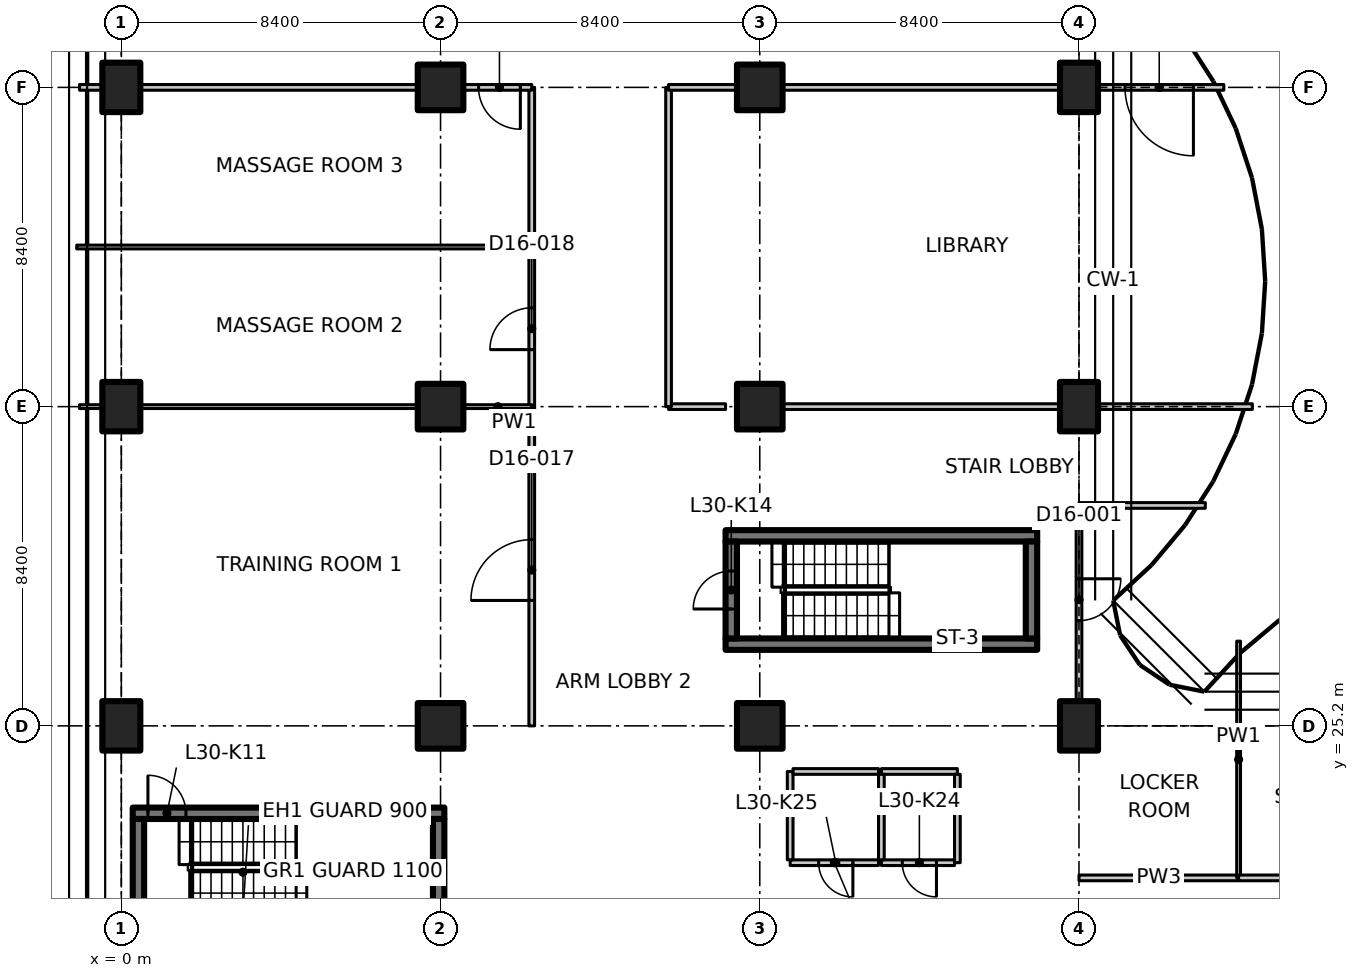
"""IFC4 building model, lengths in metres.
Left out: names, types, materials, properties, quantities, classifications, styles, units other than length and angle.
Written with IfcOpenShell. Run it as: python <this file> out.ifc"""

import sys

from ifc_helpers import new_model, si_unit, direction, frame, frame_2d, origin, origin_2d, place, context, subcontext, project, spatial, polyline, rectangle, outline, extrude, element, fill, save


model = new_model("IFC4")
c1 = context("Model", 3, precision=1e-05, world=origin(), true_north=direction((0.0, 1.0)))
c2 = subcontext(c1, "Body", "Model", "MODEL_VIEW")
j1 = project(units=[si_unit("LENGTHUNIT", "METRE"), si_unit("PLANEANGLEUNIT", "RADIAN")], contexts=[c1])
p1 = place(None, origin())
s1 = spatial("IfcSite", under=j1, at=p1, CompositionType="ELEMENT")
p2 = place(p1, origin())
s2 = spatial("IfcBuilding", under=s1, at=p2, CompositionType="ELEMENT")
p3 = place(p2, frame((0.0, 0.0, 124.1)))
s3 = spatial("IfcBuildingStorey", under=s2, at=p3, CompositionType="ELEMENT", Elevation=124.1)
for number, where, z_axis, x_axis in (
    (1, (0.0, 25.2, 0.0), (0.0, 0.0, 1.0), (1.0, 0.0, 0.0)),
    (2, (0.0, 33.6, 0.0), (0.0, 0.0, 1.0), (1.0, 0.0, 0.0)),
    (3, (0.0, 42.0, 0.0), (0.0, 0.0, 1.0), (1.0, 0.0, 0.0)),
):
    element("IfcColumn", number, at=place(p3, frame(where, z_axis=z_axis, x_axis=x_axis)), inside=s3, PredefinedType="COLUMN", context=c2, shape_type="SweptSolid", body=[
        extrude(rectangle(XDim=1.0, YDim=1.3, at=origin_2d()), origin(), (0.0, 0.0, 1.0), 3.35),
    ])
for number, where, z_axis, x_axis in (
    (4, (8.4, 25.2, 0.0), (0.0, 0.0, 1.0), (1.0, 0.0, 0.0)),
    (5, (8.4, 33.6, 0.0), (0.0, 0.0, 1.0), (1.0, 0.0, 0.0)),
    (6, (8.4, 42.0, 0.0), (0.0, 0.0, 1.0), (1.0, 0.0, 0.0)),
    (7, (16.8, 25.2, 0.0), (0.0, 0.0, 1.0), (1.0, 0.0, 0.0)),
    (8, (16.8, 33.6, 0.0), (0.0, 0.0, 1.0), (1.0, 0.0, 0.0)),
    (9, (16.8, 42.0, 0.0), (0.0, 0.0, 1.0), (1.0, 0.0, 0.0)),
):
    element("IfcColumn", number, at=place(p3, frame(where, z_axis=z_axis, x_axis=x_axis)), inside=s3, PredefinedType="COLUMN", context=c2, shape_type="SweptSolid", body=[
        extrude(rectangle(XDim=1.2, YDim=1.2, at=origin_2d()), origin(), (0.0, 0.0, 1.0), 3.35),
    ])
for number, where, z_axis, x_axis in (
    (10, (25.2, 25.2, 0.0), (0.0, 0.0, 1.0), (1.0, 0.0, 0.0)),
    (11, (25.2, 33.6, 0.0), (0.0, 0.0, 1.0), (1.0, 0.0, 0.0)),
    (12, (25.2, 42.0, 0.0), (0.0, 0.0, 1.0), (1.0, 0.0, 0.0)),
):
    element("IfcColumn", number, at=place(p3, frame(where, z_axis=z_axis, x_axis=x_axis)), inside=s3, PredefinedType="COLUMN", context=c2, shape_type="SweptSolid", body=[
        extrude(rectangle(XDim=1.0, YDim=1.3, at=origin_2d()), origin(), (0.0, 0.0, 1.0), 3.35),
    ])
p4 = place(p3, frame((0.3, 22.9, 0.0), z_axis=(0.0, 0.0, 1.0), x_axis=(1.0, 0.0, 0.0)))
e13 = element("IfcWall", 13, at=p4, inside=s3, PredefinedType="SHEAR", context=c2, shape_type="SweptSolid", body=[
    extrude(rectangle(XDim=8.2, YDim=0.3, at=frame_2d((4.1, 0.0))), origin(), (0.0, 0.0, 1.0), 3.35),
])
p5 = place(p4, frame((0.4, 0.0, 0.0)))
e14 = element("IfcOpeningElement", 14, at=p5, cuts=e13, PredefinedType="OPENING", context=c2, shape_type="SweptSolid", body=[
    extrude(rectangle(XDim=1.0, YDim=2.1, at=frame_2d((0.5, 1.05))), frame((0.0, 0.16, 0.0), z_axis=(0.0, -1.0, 0.0), x_axis=(1.0, 0.0, 0.0)), (0.0, 0.0, 1.0), 0.32),
])
for number, where, z_axis, x_axis in (
    (15, (0.45, 20.2, 0.0), (0.0, 0.0, 1.0), (0.0, 1.0, 0.0)),
    (16, (8.35, 20.2, 0.0), (0.0, 0.0, 1.0), (0.0, 1.0, 0.0)),
):
    element("IfcWall", number, at=place(p3, frame(where, z_axis=z_axis, x_axis=x_axis)), inside=s3, PredefinedType="SHEAR", context=c2, shape_type="SweptSolid", body=[
        extrude(rectangle(XDim=2.55, YDim=0.3, at=frame_2d((1.275, 0.0))), origin(), (0.0, 0.0, 1.0), 3.35),
    ])
for number, where, z_axis, x_axis in (
    (17, (15.9, 27.35, 0.0), (0.0, 0.0, 1.0), (1.0, 0.0, 0.0)),
    (18, (15.9, 30.2, 0.0), (0.0, 0.0, 1.0), (1.0, 0.0, 0.0)),
):
    element("IfcWall", number, at=place(p3, frame(where, z_axis=z_axis, x_axis=x_axis)), inside=s3, PredefinedType="SHEAR", context=c2, shape_type="SweptSolid", body=[
        extrude(rectangle(XDim=8.2, YDim=0.3, at=frame_2d((4.1, 0.0))), origin(), (0.0, 0.0, 1.0), 3.35),
    ])
p6 = place(p3, frame((16.05, 27.5, 0.0), z_axis=(0.0, 0.0, 1.0), x_axis=(0.0, 1.0, 0.0)))
e19 = element("IfcWall", 19, at=p6, inside=s3, PredefinedType="SHEAR", context=c2, shape_type="SweptSolid", body=[
    extrude(rectangle(XDim=2.55, YDim=0.3, at=frame_2d((1.275, 0.0))), origin(), (0.0, 0.0, 1.0), 3.35),
])
p7 = place(p6, frame((0.775, 0.0, 0.0)))
e20 = element("IfcOpeningElement", 20, at=p7, cuts=e19, PredefinedType="OPENING", context=c2, shape_type="SweptSolid", body=[
    extrude(rectangle(XDim=1.0, YDim=2.1, at=frame_2d((0.5, 1.05))), frame((0.0, 0.16, 0.0), z_axis=(0.0, -1.0, 0.0), x_axis=(1.0, 0.0, 0.0)), (0.0, 0.0, 1.0), 0.32),
])
p8 = place(p3, frame((23.95, 27.5, 0.0), z_axis=(0.0, 0.0, 1.0), x_axis=(0.0, 1.0, 0.0)))
e21 = element("IfcWall", 21, at=p8, inside=s3, PredefinedType="SHEAR", context=c2, shape_type="SweptSolid", body=[
    extrude(rectangle(XDim=2.55, YDim=0.3, at=frame_2d((1.275, 0.0))), origin(), (0.0, 0.0, 1.0), 3.35),
])
p9 = place(p3, frame((20.0, 24.0, 0.0), z_axis=(0.0, 0.0, 1.0), x_axis=(1.0, 0.0, 0.0)))
e22 = element("IfcWall", 22, at=p9, inside=s3, PredefinedType="PARTITIONING", context=c2, shape_type="SweptSolid", body=[
    extrude(rectangle(XDim=2.0, YDim=0.15, at=frame_2d((1.0, 0.0))), origin(), (0.0, 0.0, 1.0), 3.35),
])
p10 = place(p3, frame((22.0, 23.925, 0.0), z_axis=(0.0, 0.0, 1.0), x_axis=(0.0, -1.0, 0.0)))
e23 = element("IfcWall", 23, at=p10, inside=s3, PredefinedType="PARTITIONING", context=c2, shape_type="SweptSolid", body=[
    extrude(rectangle(XDim=2.325, YDim=0.15, at=frame_2d((1.163, 0.0))), origin(), (0.0, 0.0, 1.0), 3.35),
])
p11 = place(p3, frame((21.925, 21.6, 0.0), z_axis=(0.0, 0.0, 1.0), x_axis=(-1.0, 0.0, 0.0)))
e24 = element("IfcWall", 24, at=p11, inside=s3, PredefinedType="PARTITIONING", context=c2, shape_type="SweptSolid", body=[
    extrude(rectangle(XDim=1.925, YDim=0.15, at=frame_2d((0.962, 0.0))), origin(), (0.0, 0.0, 1.0), 3.35),
])
p12 = place(p11, frame((0.475, 0.0, 0.0)))
e25 = element("IfcOpeningElement", 25, at=p12, cuts=e24, PredefinedType="OPENING", context=c2, shape_type="SweptSolid", body=[
    extrude(rectangle(XDim=0.9, YDim=2.1, at=frame_2d((0.45, 1.05))), frame((0.0, 0.085, 0.0), z_axis=(0.0, -1.0, 0.0), x_axis=(1.0, 0.0, 0.0)), (0.0, 0.0, 1.0), 0.17),
])
p13 = place(p3, frame((20.0, 21.675, 0.0), z_axis=(0.0, 0.0, 1.0), x_axis=(0.0, 1.0, 0.0)))
e26 = element("IfcWall", 26, at=p13, inside=s3, PredefinedType="PARTITIONING", context=c2, shape_type="SweptSolid", body=[
    extrude(rectangle(XDim=2.25, YDim=0.15, at=frame_2d((1.125, 0.0))), origin(), (0.0, 0.0, 1.0), 3.35),
])
p14 = place(p3, frame((19.925, 21.6, 0.0), z_axis=(0.0, 0.0, 1.0), x_axis=(-1.0, 0.0, 0.0)))
e27 = element("IfcWall", 27, at=p14, inside=s3, PredefinedType="PARTITIONING", context=c2, shape_type="SweptSolid", body=[
    extrude(rectangle(XDim=2.325, YDim=0.15, at=frame_2d((1.163, 0.0))), origin(), (0.0, 0.0, 1.0), 3.35),
])
p15 = place(p14, frame((0.675, 0.0, 0.0)))
e28 = element("IfcOpeningElement", 28, at=p15, cuts=e27, PredefinedType="OPENING", context=c2, shape_type="SweptSolid", body=[
    extrude(rectangle(XDim=0.9, YDim=2.1, at=frame_2d((0.45, 1.05))), frame((0.0, 0.085, 0.0), z_axis=(0.0, -1.0, 0.0), x_axis=(1.0, 0.0, 0.0)), (0.0, 0.0, 1.0), 0.17),
])
p16 = place(p3, frame((17.6, 21.675, 0.0), z_axis=(0.0, 0.0, 1.0), x_axis=(0.0, 1.0, 0.0)))
e29 = element("IfcWall", 29, at=p16, inside=s3, PredefinedType="PARTITIONING", context=c2, shape_type="SweptSolid", body=[
    extrude(rectangle(XDim=2.325, YDim=0.15, at=frame_2d((1.163, 0.0))), origin(), (0.0, 0.0, 1.0), 3.35),
])
p17 = place(p3, frame((17.675, 24.0, 0.0), z_axis=(0.0, 0.0, 1.0), x_axis=(1.0, 0.0, 0.0)))
e30 = element("IfcWall", 30, at=p17, inside=s3, PredefinedType="PARTITIONING", context=c2, shape_type="SweptSolid", body=[
    extrude(rectangle(XDim=2.25, YDim=0.15, at=frame_2d((1.125, 0.0))), origin(), (0.0, 0.0, 1.0), 3.35),
])
p18 = place(p3, frame((25.2, 21.2, 0.0), z_axis=(0.0, 0.0, 1.0), x_axis=(1.0, 0.0, 0.0)))
e31 = element("IfcWall", 31, at=p18, inside=s3, PredefinedType="PARTITIONING", context=c2, shape_type="SweptSolid", body=[
    extrude(rectangle(XDim=4.2, YDim=0.15, at=frame_2d((2.1, 0.0))), origin(), (0.0, 0.0, 1.0), 3.33),
])
p19 = place(p3, frame((29.4, 27.429, 0.0), z_axis=(0.0, 0.0, 1.0), x_axis=(0.0, -1.0, 0.0)))
e32 = element("IfcWall", 32, at=p19, inside=s3, PredefinedType="PARTITIONING", context=c2, shape_type="SweptSolid", body=[
    extrude(outline(polyline([(0.0, 0.0), (6.229, 0.0), (6.229, 3.33), (2.679, 3.33), (2.677, 2.98), (1.781, 2.98), (1.779, 3.33), (0.154, 3.33), (0.0, 3.33), (0.0, 0.0)])), frame((0.0, 0.05, 0.0), z_axis=(0.0, -1.0, 0.0), x_axis=(1.0, 0.0, 0.0)), (0.0, 0.0, 1.0), 0.1),
])
p20 = place(p3, frame((25.2, 31.0, 0.0), z_axis=(0.0, 0.0, 1.0), x_axis=(0.0, -1.0, 0.0)))
e33 = element("IfcWall", 33, at=p20, inside=s3, PredefinedType="PARTITIONING", context=c2, shape_type="SweptSolid", body=[
    extrude(outline(polyline([(0.0, 0.0), (5.13, 0.0), (5.13, 2.98), (0.0, 2.98), (0.0, 0.0)])), frame((0.0, 0.075, 0.0), z_axis=(0.0, -1.0, 0.0), x_axis=(1.0, 0.0, 0.0)), (0.0, 0.0, 1.0), 0.15),
])
p21 = place(p20, frame((1.93, 0.0, 0.0)))
e34 = element("IfcOpeningElement", 34, at=p21, cuts=e33, PredefinedType="OPENING", context=c2, shape_type="SweptSolid", body=[
    extrude(rectangle(XDim=1.1, YDim=2.1, at=frame_2d((0.55, 1.05))), frame((0.0, 0.085, 0.0), z_axis=(0.0, -1.0, 0.0), x_axis=(1.0, 0.0, 0.0)), (0.0, 0.0, 1.0), 0.17),
])
p22 = place(p3, frame((25.2, 31.0, 0.0), z_axis=(0.0, 0.0, 1.0), x_axis=(1.0, 0.0, 0.0)))
e35 = element("IfcWall", 35, at=p22, inside=s3, PredefinedType="PARTITIONING", context=c2, shape_type="SweptSolid", body=[
    extrude(rectangle(XDim=3.324, YDim=0.15, at=frame_2d((1.662, 0.0))), origin(), (0.0, 0.0, 1.0), 2.98),
])
p23 = place(p3, frame((29.4, 21.2, 0.0), z_axis=(0.0, 0.0, 1.0), x_axis=(1.0, 0.0, 0.0)))
e36 = element("IfcWall", 36, at=p23, inside=s3, PredefinedType="PARTITIONING", context=c2, shape_type="SweptSolid", body=[
    extrude(rectangle(XDim=4.2, YDim=0.15, at=frame_2d((2.1, 0.0))), origin(), (0.0, 0.0, 1.0), 3.33),
])
p24 = place(p23, frame((1.5, 0.0, 0.0)))
e37 = element("IfcOpeningElement", 37, at=p24, cuts=e36, PredefinedType="OPENING", context=c2, shape_type="SweptSolid", body=[
    extrude(rectangle(XDim=1.1, YDim=2.1, at=frame_2d((0.55, 1.05))), frame((0.0, 0.085, 0.0), z_axis=(0.0, -1.0, 0.0), x_axis=(1.0, 0.0, 0.0)), (0.0, 0.0, 1.0), 0.17),
])
p25 = place(p3, frame((10.8, 25.2, 0.0), z_axis=(0.0, 0.0, 1.0), x_axis=(0.0, 1.0, 0.0)))
e38 = element("IfcWall", 38, at=p25, inside=s3, PredefinedType="PARTITIONING", context=c2, shape_type="SweptSolid", body=[
    extrude(rectangle(XDim=8.4, YDim=0.15, at=frame_2d((4.2, 0.0))), origin(), (0.0, 0.0, 1.0), 3.33),
])
p26 = place(p25, frame((3.3, 0.0, 0.0)))
e39 = element("IfcOpeningElement", 39, at=p26, cuts=e38, PredefinedType="OPENING", context=c2, shape_type="SweptSolid", body=[
    extrude(rectangle(XDim=1.6, YDim=2.1, at=frame_2d((0.8, 1.05))), frame((0.0, 0.085, 0.0), z_axis=(0.0, -1.0, 0.0), x_axis=(1.0, 0.0, 0.0)), (0.0, 0.0, 1.0), 0.17),
])
p27 = place(p3, frame((14.4, 33.6, 0.0), z_axis=(0.0, 0.0, 1.0), x_axis=(1.0, 0.0, 0.0)))
e40 = element("IfcWall", 40, at=p27, inside=s3, PredefinedType="PARTITIONING", context=c2, shape_type="SweptSolid", body=[
    extrude(rectangle(XDim=1.5, YDim=0.15, at=frame_2d((0.75, 0.0))), origin(), (0.0, 0.0, 1.0), 3.33),
])
p28 = place(p3, frame((17.42, 33.6, 0.0), z_axis=(0.0, 0.0, 1.0), x_axis=(1.0, 0.0, 0.0)))
e41 = element("IfcWall", 41, at=p28, inside=s3, PredefinedType="PARTITIONING", context=c2, shape_type="SweptSolid", body=[
    extrude(rectangle(XDim=7.26, YDim=0.15, at=frame_2d((3.63, 0.0))), origin(), (0.0, 0.0, 1.0), 3.33),
])
p29 = place(p3, frame((25.72, 33.6, 0.0), z_axis=(0.0, 0.0, 1.0), x_axis=(1.0, 0.0, 0.0)))
e42 = element("IfcWall", 42, at=p29, inside=s3, PredefinedType="PARTITIONING", context=c2, shape_type="SweptSolid", body=[
    extrude(rectangle(XDim=4.042, YDim=0.15, at=frame_2d((2.021, 0.0))), origin(), (0.0, 0.0, 1.0), 2.98),
])
p30 = place(p3, frame((10.8, 33.6, 0.0), z_axis=(0.0, 0.0, 1.0), x_axis=(0.0, 1.0, 0.0)))
e43 = element("IfcWall", 43, at=p30, inside=s3, PredefinedType="PARTITIONING", context=c2, shape_type="SweptSolid", body=[
    extrude(rectangle(XDim=4.2, YDim=0.15, at=frame_2d((2.1, 0.0))), origin(), (0.0, 0.0, 1.0), 3.33),
])
p31 = place(p30, frame((1.5, 0.0, 0.0)))
e44 = element("IfcOpeningElement", 44, at=p31, cuts=e43, PredefinedType="OPENING", context=c2, shape_type="SweptSolid", body=[
    extrude(rectangle(XDim=1.1, YDim=2.1, at=frame_2d((0.55, 1.05))), frame((0.0, 0.085, 0.0), z_axis=(0.0, -1.0, 0.0), x_axis=(1.0, 0.0, 0.0)), (0.0, 0.0, 1.0), 0.17),
])
p32 = place(p3, frame((10.8, 37.8, 0.0), z_axis=(0.0, 0.0, 1.0), x_axis=(0.0, 1.0, 0.0)))
e45 = element("IfcWall", 45, at=p32, inside=s3, PredefinedType="PARTITIONING", context=c2, shape_type="SweptSolid", body=[
    extrude(rectangle(XDim=4.2, YDim=0.15, at=frame_2d((2.1, 0.0))), origin(), (0.0, 0.0, 1.0), 3.33),
])
p33 = place(p3, frame((14.4, 42.0, 0.0), z_axis=(0.0, 0.0, 1.0), x_axis=(0.0, -1.0, 0.0)))
e46 = element("IfcWall", 46, at=p33, inside=s3, PredefinedType="PARTITIONING", context=c2, shape_type="SweptSolid", body=[
    extrude(rectangle(XDim=8.4, YDim=0.15, at=frame_2d((4.2, 0.0))), origin(), (0.0, 0.0, 1.0), 3.33),
])
p34 = place(p3, frame((10.8, 42.0, 0.0), z_axis=(0.0, 0.0, 1.0), x_axis=(-1.0, 0.0, 0.0)))
e47 = element("IfcWall", 47, at=p34, inside=s3, PredefinedType="PARTITIONING", context=c2, shape_type="SweptSolid", body=[
    extrude(rectangle(XDim=1.78, YDim=0.15, at=frame_2d((0.89, 0.0))), origin(), (0.0, 0.0, 1.0), 3.33),
])
p35 = place(p34, frame((0.3, 0.0, 0.0)))
e48 = element("IfcOpeningElement", 48, at=p35, cuts=e47, PredefinedType="OPENING", context=c2, shape_type="SweptSolid", body=[
    extrude(rectangle(XDim=1.1, YDim=2.1, at=frame_2d((0.55, 1.05))), frame((0.0, 0.085, 0.0), z_axis=(0.0, -1.0, 0.0), x_axis=(1.0, 0.0, 0.0)), (0.0, 0.0, 1.0), 0.17),
])
p36 = place(p3, frame((7.78, 42.0, 0.0), z_axis=(0.0, 0.0, 1.0), x_axis=(-1.0, 0.0, 0.0)))
e49 = element("IfcWall", 49, at=p36, inside=s3, PredefinedType="PARTITIONING", context=c2, shape_type="SweptSolid", body=[
    extrude(rectangle(XDim=7.26, YDim=0.15, at=frame_2d((3.63, 0.0))), origin(), (0.0, 0.0, 1.0), 3.33),
])
p37 = place(p3, frame((-0.52, 42.0, 0.0), z_axis=(0.0, 0.0, 1.0), x_axis=(-1.0, 0.0, 0.0)))
e50 = element("IfcWall", 50, at=p37, inside=s3, PredefinedType="PARTITIONING", context=c2, shape_type="SweptSolid", body=[
    extrude(rectangle(XDim=0.58, YDim=0.15, at=frame_2d((0.29, 0.0))), origin(), (0.0, 0.0, 1.0), 3.33),
])
p38 = place(p3, frame((-1.1, 33.6, 0.0), z_axis=(0.0, 0.0, 1.0), x_axis=(1.0, 0.0, 0.0)))
e51 = element("IfcWall", 51, at=p38, inside=s3, PredefinedType="PARTITIONING", context=c2, shape_type="SweptSolid", body=[
    extrude(rectangle(XDim=0.58, YDim=0.1, at=frame_2d((0.29, 0.0))), origin(), (0.0, 0.0, 1.0), 3.33),
])
p39 = place(p3, frame((0.52, 33.6, 0.0), z_axis=(0.0, 0.0, 1.0), x_axis=(1.0, 0.0, 0.0)))
e52 = element("IfcWall", 52, at=p39, inside=s3, PredefinedType="PARTITIONING", context=c2, shape_type="SweptSolid", body=[
    extrude(rectangle(XDim=7.26, YDim=0.1, at=frame_2d((3.63, 0.0))), origin(), (0.0, 0.0, 1.0), 3.33),
])
p40 = place(p3, frame((9.02, 33.6, 0.0), z_axis=(0.0, 0.0, 1.0), x_axis=(1.0, 0.0, 0.0)))
e53 = element("IfcWall", 53, at=p40, inside=s3, PredefinedType="PARTITIONING", context=c2, shape_type="SweptSolid", body=[
    extrude(rectangle(XDim=1.78, YDim=0.1, at=frame_2d((0.89, 0.0))), origin(), (0.0, 0.0, 1.0), 3.33),
])
p41 = place(p3, frame((-1.174, 37.8, 0.0), z_axis=(0.0, 0.0, 1.0), x_axis=(1.0, 0.0, 0.0)))
e54 = element("IfcWall", 54, at=p41, inside=s3, PredefinedType="PARTITIONING", context=c2, shape_type="SweptSolid", body=[
    extrude(outline(polyline([(0.0, 0.0), (11.974, 0.0), (11.974, 3.33), (1.624, 3.33), (1.622, 2.98), (0.726, 2.98), (0.724, 3.33), (0.074, 3.33), (0.0, 3.33), (0.0, 0.0)])), frame((0.0, 0.05, 0.0), z_axis=(0.0, -1.0, 0.0), x_axis=(1.0, 0.0, 0.0)), (0.0, 0.0, 1.0), 0.1),
])
p42 = place(p3, frame((29.011, 42.0, 0.0), z_axis=(0.0, 0.0, 1.0), x_axis=(-1.0, 0.0, 0.0)))
e55 = element("IfcWall", 55, at=p42, inside=s3, PredefinedType="PARTITIONING", context=c2, shape_type="SweptSolid", body=[
    extrude(rectangle(XDim=3.292, YDim=0.15, at=frame_2d((1.646, 0.0))), origin(), (0.0, 0.0, 1.0), 2.98),
])
p43 = place(p42, frame((0.8, 0.0, 0.0)))
e56 = element("IfcOpeningElement", 56, at=p43, cuts=e55, PredefinedType="OPENING", context=c2, shape_type="SweptSolid", body=[
    extrude(rectangle(XDim=1.8, YDim=2.1, at=frame_2d((0.9, 1.05))), frame((0.0, 0.085, 0.0), z_axis=(0.0, -1.0, 0.0), x_axis=(1.0, 0.0, 0.0)), (0.0, 0.0, 1.0), 0.17),
])
p44 = place(p3, frame((24.68, 42.0, 0.0), z_axis=(0.0, 0.0, 1.0), x_axis=(-1.0, 0.0, 0.0)))
e57 = element("IfcWall", 57, at=p44, inside=s3, PredefinedType="PARTITIONING", context=c2, shape_type="SweptSolid", body=[
    extrude(rectangle(XDim=7.26, YDim=0.15, at=frame_2d((3.63, 0.0))), origin(), (0.0, 0.0, 1.0), 3.33),
])
p45 = place(p3, frame((16.18, 42.0, 0.0), z_axis=(0.0, 0.0, 1.0), x_axis=(-1.0, 0.0, 0.0)))
e58 = element("IfcWall", 58, at=p45, inside=s3, PredefinedType="PARTITIONING", context=c2, shape_type="SweptSolid", body=[
    extrude(rectangle(XDim=1.78, YDim=0.15, at=frame_2d((0.89, 0.0))), origin(), (0.0, 0.0, 1.0), 3.33),
])
p46 = place(p5, origin())
e59 = element("IfcDoor", 59, at=p46, inside=s3, OperationType="SINGLE_SWING_RIGHT", PredefinedType="DOOR", context=c2, shape_type="SweptSolid", body=[
    extrude(rectangle(XDim=1.0, YDim=2.1, at=frame_2d((0.5, 1.05))), frame((0.0, 0.025, 0.0), z_axis=(0.0, -1.0, 0.0), x_axis=(1.0, 0.0, 0.0)), (0.0, 0.0, 1.0), 0.05),
])
fill(e14, e59)
p47 = place(p7, origin())
e60 = element("IfcDoor", 60, at=p47, inside=s3, OperationType="SINGLE_SWING_LEFT", PredefinedType="DOOR", context=c2, shape_type="SweptSolid", body=[
    extrude(rectangle(XDim=1.0, YDim=2.1, at=frame_2d((0.5, 1.05))), frame((0.0, 0.025, 0.0), z_axis=(0.0, -1.0, 0.0), x_axis=(1.0, 0.0, 0.0)), (0.0, 0.0, 1.0), 0.05),
])
fill(e20, e60)
p48 = place(p12, origin())
e61 = element("IfcDoor", 61, at=p48, inside=s3, OperationType="SINGLE_SWING_LEFT", PredefinedType="DOOR", context=c2, shape_type="SweptSolid", body=[
    extrude(rectangle(XDim=0.9, YDim=2.1, at=frame_2d((0.45, 1.05))), frame((0.0, 0.025, 0.0), z_axis=(0.0, -1.0, 0.0), x_axis=(1.0, 0.0, 0.0)), (0.0, 0.0, 1.0), 0.05),
])
fill(e25, e61)
p49 = place(p15, origin())
e62 = element("IfcDoor", 62, at=p49, inside=s3, OperationType="SINGLE_SWING_RIGHT", PredefinedType="DOOR", context=c2, shape_type="SweptSolid", body=[
    extrude(rectangle(XDim=0.9, YDim=2.1, at=frame_2d((0.45, 1.05))), frame((0.0, 0.025, 0.0), z_axis=(0.0, -1.0, 0.0), x_axis=(1.0, 0.0, 0.0)), (0.0, 0.0, 1.0), 0.05),
])
fill(e28, e62)
p50 = place(p21, origin())
e63 = element("IfcDoor", 63, at=p50, inside=s3, OperationType="SINGLE_SWING_RIGHT", PredefinedType="DOOR", context=c2, shape_type="SweptSolid", body=[
    extrude(rectangle(XDim=1.1, YDim=2.1, at=frame_2d((0.55, 1.05))), frame((0.0, 0.025, 0.0), z_axis=(0.0, -1.0, 0.0), x_axis=(1.0, 0.0, 0.0)), (0.0, 0.0, 1.0), 0.05),
])
fill(e34, e63)
p51 = place(p26, origin())
e64 = element("IfcDoor", 64, at=p51, inside=s3, OperationType="DOUBLE_DOOR_SINGLE_SWING", PredefinedType="DOOR", context=c2, shape_type="SweptSolid", body=[
    extrude(rectangle(XDim=1.6, YDim=2.1, at=frame_2d((0.8, 1.05))), frame((0.0, 0.025, 0.0), z_axis=(0.0, -1.0, 0.0), x_axis=(1.0, 0.0, 0.0)), (0.0, 0.0, 1.0), 0.05),
])
fill(e39, e64)
p52 = place(p31, origin())
e65 = element("IfcDoor", 65, at=p52, inside=s3, OperationType="SINGLE_SWING_LEFT", PredefinedType="DOOR", context=c2, shape_type="SweptSolid", body=[
    extrude(rectangle(XDim=1.1, YDim=2.1, at=frame_2d((0.55, 1.05))), frame((0.0, 0.025, 0.0), z_axis=(0.0, -1.0, 0.0), x_axis=(1.0, 0.0, 0.0)), (0.0, 0.0, 1.0), 0.05),
])
fill(e44, e65)
p53 = place(p35, origin())
e66 = element("IfcDoor", 66, at=p53, inside=s3, OperationType="SINGLE_SWING_LEFT", PredefinedType="DOOR", context=c2, shape_type="SweptSolid", body=[
    extrude(rectangle(XDim=1.1, YDim=2.1, at=frame_2d((0.55, 1.05))), frame((0.0, 0.025, 0.0), z_axis=(0.0, -1.0, 0.0), x_axis=(1.0, 0.0, 0.0)), (0.0, 0.0, 1.0), 0.05),
])
fill(e48, e66)
p54 = place(p43, origin())
e67 = element("IfcDoor", 67, at=p54, inside=s3, OperationType="DOUBLE_DOOR_SINGLE_SWING", PredefinedType="DOOR", context=c2, shape_type="SweptSolid", body=[
    extrude(rectangle(XDim=1.8, YDim=2.1, at=frame_2d((0.9, 1.05))), frame((0.0, 0.025, 0.0), z_axis=(0.0, -1.0, 0.0), x_axis=(1.0, 0.0, 0.0)), (0.0, 0.0, 1.0), 0.05),
])
fill(e56, e67)
save(model, sys.argv[1])
